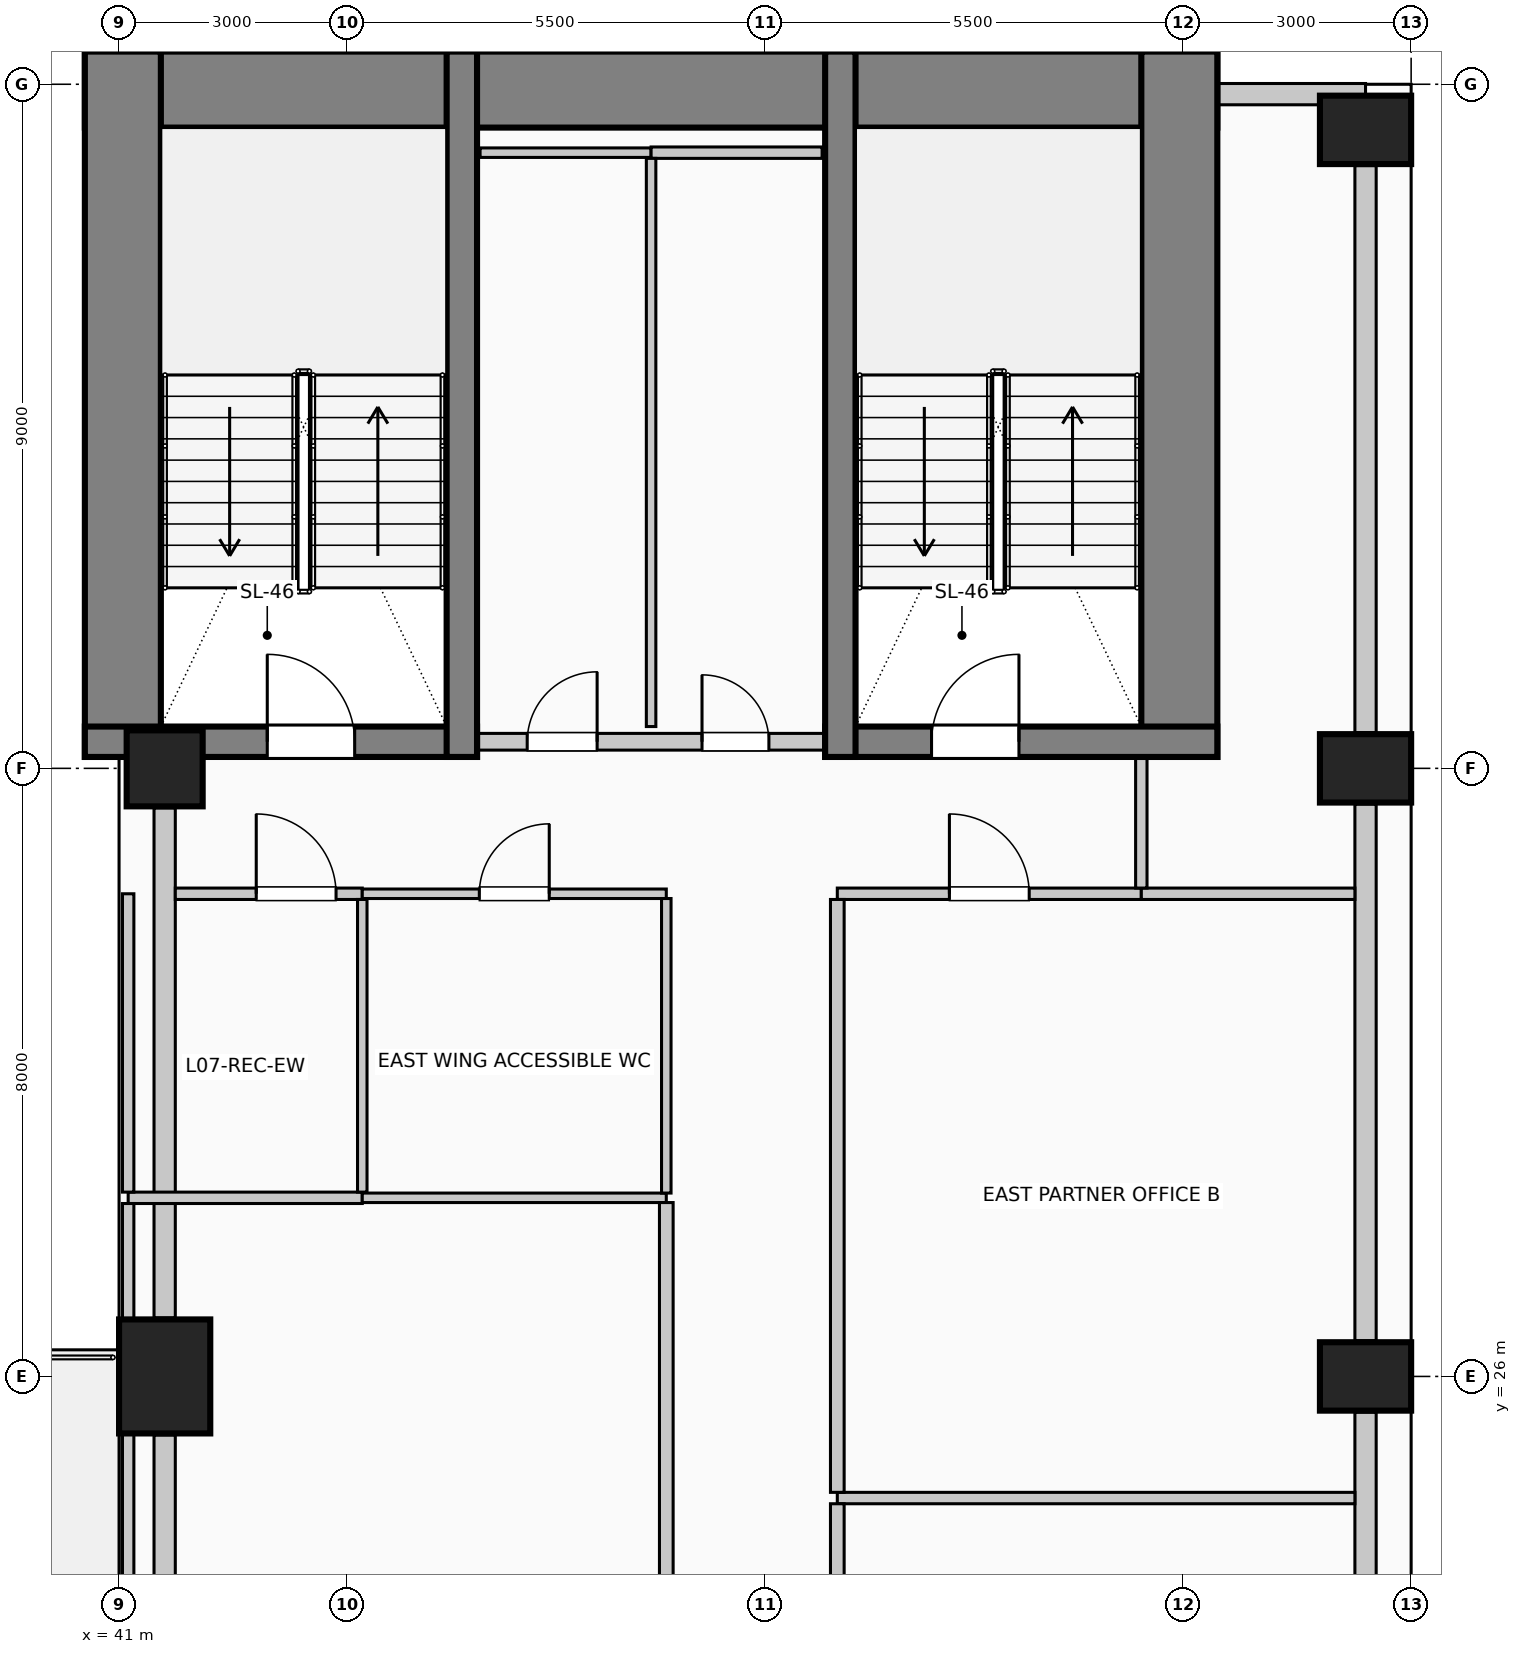
"""IFC4 building model, lengths in metres.
Left out: names, types, materials, properties, quantities, classifications, styles, units other than length and angle.
Written with IfcOpenShell. Run it as: python <this file> out.ifc"""

import sys

from ifc_helpers import new_model, si_unit, direction, frame, frame_2d, origin, origin_2d, place, context, subcontext, project, spatial, rectangle, circle, extrude, element, fill, save


model = new_model("IFC4")
c1 = context("Model", 3, precision=1e-05, world=origin(), true_north=direction((0.0, 1.0)))
c2 = subcontext(c1, "Body", "Model", "MODEL_VIEW")
j1 = project(units=[si_unit("LENGTHUNIT", "METRE"), si_unit("PLANEANGLEUNIT", "RADIAN")], contexts=[c1])
p1 = place(None, origin())
s1 = spatial("IfcSite", under=j1, at=p1, CompositionType="ELEMENT")
p2 = place(p1, origin())
s2 = spatial("IfcBuilding", under=s1, at=p2, CompositionType="ELEMENT")
p3 = place(p2, frame((0.0, 0.0, 30.6)))
s3 = spatial("IfcBuildingStorey", under=s2, at=p3, CompositionType="ELEMENT", Elevation=30.6)
p4 = place(p3, frame((40.55, 42.93, 0.0), z_axis=(0.0, 0.0, 1.0), x_axis=(1.0, 0.0, 0.0)))
e1 = element("IfcWall", 1, at=p4, inside=s3, PredefinedType="SHEAR", context=c2, shape_type="SweptSolid", body=[
    extrude(rectangle(XDim=14.9, YDim=1.0, at=frame_2d((7.45, 0.0))), origin(), (0.0, 0.0, 1.0), 4.0),
])
for number, where, z_axis, x_axis in (
    (2, (41.05, 34.15, 0.0), (0.0, 0.0, 1.0), (0.0, 1.0, 0.0)),
    (3, (54.95, 34.15, 0.0), (0.0, 0.0, 1.0), (0.0, 1.0, 0.0)),
):
    element("IfcWall", number, at=place(p3, frame(where, z_axis=z_axis, x_axis=x_axis)), inside=s3, PredefinedType="SHEAR", context=c2, shape_type="SweptSolid", body=[
        extrude(rectangle(XDim=9.28, YDim=1.0, at=frame_2d((4.64, 0.0))), origin(), (0.0, 0.0, 1.0), 4.0),
    ])
p5 = place(p3, frame((40.55, 34.35, 0.0), z_axis=(0.0, 0.0, 1.0), x_axis=(1.0, 0.0, 0.0)))
e4 = element("IfcWall", 4, at=p5, inside=s3, PredefinedType="SHEAR", context=c2, shape_type="SweptSolid", body=[
    extrude(rectangle(XDim=5.16, YDim=0.4, at=frame_2d((2.58, 0.0))), origin(), (0.0, 0.0, 1.0), 4.0),
])
p6 = place(p5, frame((2.4, 0.0, 0.0)))
e5 = element("IfcOpeningElement", 5, at=p6, cuts=e4, PredefinedType="OPENING", context=c2, shape_type="SweptSolid", body=[
    extrude(rectangle(XDim=1.15, YDim=2.2, at=frame_2d((0.575, 1.1))), frame((0.0, 0.21, 0.0), z_axis=(0.0, -1.0, 0.0), x_axis=(1.0, 0.0, 0.0)), (0.0, 0.0, 1.0), 0.42),
])
p7 = place(p3, frame((45.51, 34.15, 0.0), z_axis=(0.0, 0.0, 1.0), x_axis=(0.0, 1.0, 0.0)))
e6 = element("IfcWall", 6, at=p7, inside=s3, PredefinedType="SHEAR", context=c2, shape_type="SweptSolid", body=[
    extrude(rectangle(XDim=9.28, YDim=0.4, at=frame_2d((4.64, 0.0))), origin(), (0.0, 0.0, 1.0), 4.0),
])
p8 = place(p3, frame((50.29, 34.35, 0.0), z_axis=(0.0, 0.0, 1.0), x_axis=(1.0, 0.0, 0.0)))
e7 = element("IfcWall", 7, at=p8, inside=s3, PredefinedType="SHEAR", context=c2, shape_type="SweptSolid", body=[
    extrude(rectangle(XDim=5.16, YDim=0.4, at=frame_2d((2.58, 0.0))), origin(), (0.0, 0.0, 1.0), 4.0),
])
p9 = place(p8, frame((1.4, 0.0, 0.0)))
e8 = element("IfcOpeningElement", 8, at=p9, cuts=e7, PredefinedType="OPENING", context=c2, shape_type="SweptSolid", body=[
    extrude(rectangle(XDim=1.15, YDim=2.2, at=frame_2d((0.575, 1.1))), frame((0.0, 0.21, 0.0), z_axis=(0.0, -1.0, 0.0), x_axis=(1.0, 0.0, 0.0)), (0.0, 0.0, 1.0), 0.42),
])
p10 = place(p3, frame((50.49, 34.15, 0.0), z_axis=(0.0, 0.0, 1.0), x_axis=(0.0, 1.0, 0.0)))
e9 = element("IfcWall", 9, at=p10, inside=s3, PredefinedType="SHEAR", context=c2, shape_type="SweptSolid", body=[
    extrude(rectangle(XDim=9.28, YDim=0.4, at=frame_2d((4.64, 0.0))), origin(), (0.0, 0.0, 1.0), 4.0),
])
for number, where, z_axis, x_axis in (
    (10, (57.4, 26.0, 0.0), (0.0, 0.0, 1.0), (0.0, 1.0, 0.0)),
    (11, (57.4, 34.0, 0.0), (0.0, 0.0, 1.0), (0.0, 1.0, 0.0)),
    (12, (57.4, 42.4, 0.0), (0.0, 0.0, 1.0), (0.0, 1.0, 0.0)),
):
    element("IfcColumn", number, at=place(p3, frame(where, z_axis=z_axis, x_axis=x_axis)), inside=s3, PredefinedType="COLUMN", context=c2, shape_type="SweptSolid", body=[
        extrude(rectangle(XDim=0.9, YDim=1.2, at=origin_2d()), origin(), (0.0, 0.0, 1.0), 4.0),
    ])
p11 = place(p3, frame((41.6, 26.0, 0.0), z_axis=(0.0, 0.0, 1.0), x_axis=(1.0, 0.0, 0.0)))
e13 = element("IfcColumn", 13, at=p11, inside=s3, PredefinedType="COLUMN", context=c2, shape_type="SweptSolid", body=[
    extrude(rectangle(XDim=1.2, YDim=1.5, at=origin_2d()), origin(), (0.0, 0.0, 1.0), 4.0),
])
p12 = place(p3, frame((41.6, 34.0, 0.0), z_axis=(0.0, 0.0, 1.0), x_axis=(1.0, 0.0, 0.0)))
e14 = element("IfcColumn", 14, at=p12, inside=s3, PredefinedType="COLUMN", context=c2, shape_type="SweptSolid", body=[
    extrude(circle(Radius=0.5, at=origin_2d()), origin(), (0.0, 0.0, 1.0), 4.0),
])
for number, where, z_axis, x_axis in (
    (15, (57.4, 25.53, 0.0), (0.0, 0.0, 1.0), (0.0, -1.0, 0.0)),
    (16, (57.4, 33.53, 0.0), (0.0, 0.0, 1.0), (0.0, -1.0, 0.0)),
):
    element("IfcWall", number, at=place(p3, frame(where, z_axis=z_axis, x_axis=x_axis)), inside=s3, PredefinedType="SOLIDWALL", context=c2, shape_type="SweptSolid", body=[
        extrude(rectangle(XDim=7.06, YDim=0.28, at=frame_2d((3.53, 0.0))), origin(), (0.0, 0.0, 1.0), 2.85),
    ])
p13 = place(p3, frame((57.4, 41.93, 0.0), z_axis=(0.0, 0.0, 1.0), x_axis=(0.0, -1.0, 0.0)))
e17 = element("IfcWall", 17, at=p13, inside=s3, PredefinedType="SOLIDWALL", context=c2, shape_type="SweptSolid", body=[
    extrude(rectangle(XDim=7.46, YDim=0.28, at=frame_2d((3.73, 0.0))), origin(), (0.0, 0.0, 1.0), 2.85),
])
p14 = place(p3, frame((55.455, 42.87, 0.0), z_axis=(0.0, 0.0, 1.0), x_axis=(1.0, 0.0, 0.0)))
e18 = element("IfcWall", 18, at=p14, inside=s3, PredefinedType="SOLIDWALL", context=c2, shape_type="SweptSolid", body=[
    extrude(rectangle(XDim=1.945, YDim=0.28, at=frame_2d((0.972, 0.0))), origin(), (0.0, 0.0, 1.0), 3.7),
])
p15 = place(p3, frame((41.6, 18.77, 0.0), z_axis=(0.0, 0.0, 1.0), x_axis=(0.0, 1.0, 0.0)))
e19 = element("IfcWall", 19, at=p15, inside=s3, PredefinedType="SOLIDWALL", context=c2, shape_type="SweptSolid", body=[
    extrude(rectangle(XDim=6.46, YDim=0.28, at=frame_2d((3.23, 0.0))), origin(), (0.0, 0.0, 1.0), 3.0),
])
p16 = place(p3, frame((41.6, 26.77, 0.0), z_axis=(0.0, 0.0, 1.0), x_axis=(0.0, 1.0, 0.0)))
e20 = element("IfcWall", 20, at=p16, inside=s3, PredefinedType="SOLIDWALL", context=c2, shape_type="SweptSolid", body=[
    extrude(rectangle(XDim=6.71, YDim=0.28, at=frame_2d((3.355, 0.0))), origin(), (0.0, 0.0, 1.0), 3.0),
])
p17 = place(p3, frame((45.72, 34.35, 0.0), z_axis=(0.0, 0.0, 1.0), x_axis=(1.0, 0.0, 0.0)))
e21 = element("IfcWall", 21, at=p17, inside=s3, PredefinedType="PARTITIONING", context=c2, shape_type="SweptSolid", body=[
    extrude(rectangle(XDim=4.56, YDim=0.22, at=frame_2d((2.28, 0.0))), origin(), (0.0, 0.0, 1.0), 3.7),
])
p18 = place(p17, frame((0.65, 0.0, 0.0)))
e22 = element("IfcOpeningElement", 22, at=p18, cuts=e21, PredefinedType="OPENING", context=c2, shape_type="SweptSolid", body=[
    extrude(rectangle(XDim=0.92, YDim=2.1, at=frame_2d((0.46, 1.05))), frame((0.0, 0.12, 0.0), z_axis=(0.0, -1.0, 0.0), x_axis=(1.0, 0.0, 0.0)), (0.0, 0.0, 1.0), 0.24),
])
p19 = place(p17, frame((2.95, 0.0, 0.0)))
e23 = element("IfcOpeningElement", 23, at=p19, cuts=e21, PredefinedType="OPENING", context=c2, shape_type="SweptSolid", body=[
    extrude(rectangle(XDim=0.88, YDim=2.1, at=frame_2d((0.44, 1.05))), frame((0.0, 0.12, 0.0), z_axis=(0.0, -1.0, 0.0), x_axis=(1.0, 0.0, 0.0)), (0.0, 0.0, 1.0), 0.24),
])
p20 = place(p3, frame((50.45, 24.4, 0.0), z_axis=(0.0, 0.0, 1.0), x_axis=(1.0, 0.0, 0.0)))
e24 = element("IfcWall", 24, at=p20, inside=s3, PredefinedType="PARTITIONING", context=c2, shape_type="SweptSolid", body=[
    extrude(rectangle(XDim=6.81, YDim=0.15, at=frame_2d((3.405, 0.0))), origin(), (0.0, 0.0, 1.0), 3.7),
])
p21 = place(p3, frame((41.12, 28.35, 0.0), z_axis=(0.0, 0.0, 1.0), x_axis=(1.0, 0.0, 0.0)))
e25 = element("IfcWall", 25, at=p21, inside=s3, PredefinedType="PARTITIONING", context=c2, shape_type="SweptSolid", body=[
    extrude(rectangle(XDim=3.08, YDim=0.15, at=frame_2d((1.54, 0.0))), origin(), (0.0, 0.0, 1.0), 3.7),
])
p22 = place(p3, frame((44.2, 28.35, 0.0), z_axis=(0.0, 0.0, 1.0), x_axis=(1.0, 0.0, 0.0)))
e26 = element("IfcWall", 26, at=p22, inside=s3, PredefinedType="PARTITIONING", context=c2, shape_type="SweptSolid", body=[
    extrude(rectangle(XDim=4.0, YDim=0.125, at=frame_2d((2.0, 0.0))), origin(), (0.0, 0.0, 1.0), 3.7),
])
p23 = place(p3, frame((41.74, 32.35, 0.0), z_axis=(0.0, 0.0, 1.0), x_axis=(1.0, 0.0, 0.0)))
e27 = element("IfcWall", 27, at=p23, inside=s3, PredefinedType="PARTITIONING", context=c2, shape_type="SweptSolid", body=[
    extrude(rectangle(XDim=2.46, YDim=0.15, at=frame_2d((1.23, 0.0))), origin(), (0.0, 0.0, 1.0), 3.7),
])
p24 = place(p23, frame((1.065, 0.0, 0.0)))
e28 = element("IfcOpeningElement", 28, at=p24, cuts=e27, PredefinedType="OPENING", context=c2, shape_type="SweptSolid", body=[
    extrude(rectangle(XDim=1.05, YDim=2.15, at=frame_2d((0.525, 1.075))), frame((0.0, 0.085, 0.0), z_axis=(0.0, -1.0, 0.0), x_axis=(1.0, 0.0, 0.0)), (0.0, 0.0, 1.0), 0.17),
])
p25 = place(p3, frame((44.2, 32.35, 0.0), z_axis=(0.0, 0.0, 1.0), x_axis=(1.0, 0.0, 0.0)))
e29 = element("IfcWall", 29, at=p25, inside=s3, PredefinedType="PARTITIONING", context=c2, shape_type="SweptSolid", body=[
    extrude(rectangle(XDim=4.0, YDim=0.125, at=frame_2d((2.0, 0.0))), origin(), (0.0, 0.0, 1.0), 3.7),
])
p26 = place(p25, frame((1.54, 0.0, 0.0)))
e30 = element("IfcOpeningElement", 30, at=p26, cuts=e29, PredefinedType="OPENING", context=c2, shape_type="SweptSolid", body=[
    extrude(rectangle(XDim=0.92, YDim=2.1, at=frame_2d((0.46, 1.05))), frame((0.0, 0.073, 0.0), z_axis=(0.0, -1.0, 0.0), x_axis=(1.0, 0.0, 0.0)), (0.0, 0.0, 1.0), 0.145),
])
p27 = place(p3, frame((50.45, 32.35, 0.0), z_axis=(0.0, 0.0, 1.0), x_axis=(1.0, 0.0, 0.0)))
e31 = element("IfcWall", 31, at=p27, inside=s3, PredefinedType="PARTITIONING", context=c2, shape_type="SweptSolid", body=[
    extrude(rectangle(XDim=4.0, YDim=0.15, at=frame_2d((2.0, 0.0))), origin(), (0.0, 0.0, 1.0), 3.7),
])
p28 = place(p27, frame((1.475, 0.0, 0.0)))
e32 = element("IfcOpeningElement", 32, at=p28, cuts=e31, PredefinedType="OPENING", context=c2, shape_type="SweptSolid", body=[
    extrude(rectangle(XDim=1.05, YDim=2.15, at=frame_2d((0.525, 1.075))), frame((0.0, 0.085, 0.0), z_axis=(0.0, -1.0, 0.0), x_axis=(1.0, 0.0, 0.0)), (0.0, 0.0, 1.0), 0.17),
])
p29 = place(p3, frame((54.45, 32.35, 0.0), z_axis=(0.0, 0.0, 1.0), x_axis=(1.0, 0.0, 0.0)))
e33 = element("IfcWall", 33, at=p29, inside=s3, PredefinedType="PARTITIONING", context=c2, shape_type="SweptSolid", body=[
    extrude(rectangle(XDim=2.81, YDim=0.15, at=frame_2d((1.405, 0.0))), origin(), (0.0, 0.0, 1.0), 3.7),
])
p30 = place(p3, frame((45.75, 42.1, 0.0), z_axis=(0.0, 0.0, 1.0), x_axis=(1.0, 0.0, 0.0)))
e34 = element("IfcWall", 34, at=p30, inside=s3, PredefinedType="PARTITIONING", context=c2, shape_type="SweptSolid", body=[
    extrude(rectangle(XDim=2.25, YDim=0.125, at=frame_2d((1.125, 0.0))), origin(), (0.0, 0.0, 1.0), 3.7),
])
p31 = place(p3, frame((48.0, 42.1, 0.0), z_axis=(0.0, 0.0, 1.0), x_axis=(1.0, 0.0, 0.0)))
e35 = element("IfcWall", 35, at=p31, inside=s3, PredefinedType="PARTITIONING", context=c2, shape_type="SweptSolid", body=[
    extrude(rectangle(XDim=2.25, YDim=0.15, at=frame_2d((1.125, 0.0))), origin(), (0.0, 0.0, 1.0), 3.7),
])
p32 = place(p3, frame((41.12, 18.75, 0.0), z_axis=(0.0, 0.0, 1.0), x_axis=(0.0, 1.0, 0.0)))
e36 = element("IfcWall", 36, at=p32, inside=s3, PredefinedType="PARTITIONING", context=c2, shape_type="SweptSolid", body=[
    extrude(rectangle(XDim=6.5, YDim=0.15, at=frame_2d((3.25, 0.0))), origin(), (0.0, 0.0, 1.0), 3.7),
])
p33 = place(p3, frame((41.12, 26.75, 0.0), z_axis=(0.0, 0.0, 1.0), x_axis=(0.0, 1.0, 0.0)))
e37 = element("IfcWall", 37, at=p33, inside=s3, PredefinedType="PARTITIONING", context=c2, shape_type="SweptSolid", body=[
    extrude(rectangle(XDim=1.525, YDim=0.15, at=frame_2d((0.762, 0.0))), origin(), (0.0, 0.0, 1.0), 3.7),
])
p34 = place(p3, frame((41.12, 28.425, 0.0), z_axis=(0.0, 0.0, 1.0), x_axis=(0.0, 1.0, 0.0)))
e38 = element("IfcWall", 38, at=p34, inside=s3, PredefinedType="PARTITIONING", context=c2, shape_type="SweptSolid", body=[
    extrude(rectangle(XDim=3.925, YDim=0.15, at=frame_2d((1.962, 0.0))), origin(), (0.0, 0.0, 1.0), 3.7),
])
p35 = place(p3, frame((44.2, 28.425, 0.0), z_axis=(0.0, 0.0, 1.0), x_axis=(0.0, 1.0, 0.0)))
e39 = element("IfcWall", 39, at=p35, inside=s3, PredefinedType="PARTITIONING", context=c2, shape_type="SweptSolid", body=[
    extrude(rectangle(XDim=3.85, YDim=0.125, at=frame_2d((1.925, 0.0))), origin(), (0.0, 0.0, 1.0), 3.7),
])
p36 = place(p3, frame((48.0, 34.55, 0.0), z_axis=(0.0, 0.0, 1.0), x_axis=(0.0, 1.0, 0.0)))
e40 = element("IfcWall", 40, at=p36, inside=s3, PredefinedType="PARTITIONING", context=c2, shape_type="SweptSolid", body=[
    extrude(rectangle(XDim=7.475, YDim=0.125, at=frame_2d((3.737, 0.0))), origin(), (0.0, 0.0, 1.0), 3.7),
])
p37 = place(p3, frame((48.2, 15.875, 0.0), z_axis=(0.0, 0.0, 1.0), x_axis=(0.0, 1.0, 0.0)))
e41 = element("IfcWall", 41, at=p37, inside=s3, PredefinedType="PARTITIONING", context=c2, shape_type="SweptSolid", body=[
    extrude(rectangle(XDim=12.413, YDim=0.18, at=frame_2d((6.206, 0.0))), origin(), (0.0, 0.0, 1.0), 3.7),
])
p38 = place(p37, frame((5.731, 0.0, 0.0)))
e42 = element("IfcOpeningElement", 42, at=p38, cuts=e41, PredefinedType="OPENING", context=c2, shape_type="SweptSolid", body=[
    extrude(rectangle(XDim=0.95, YDim=2.15, at=frame_2d((0.475, 1.075))), frame((0.0, 0.1, 0.0), z_axis=(0.0, -1.0, 0.0), x_axis=(1.0, 0.0, 0.0)), (0.0, 0.0, 1.0), 0.2),
])
p39 = place(p3, frame((48.2, 28.413, 0.0), z_axis=(0.0, 0.0, 1.0), x_axis=(0.0, 1.0, 0.0)))
e43 = element("IfcWall", 43, at=p39, inside=s3, PredefinedType="PARTITIONING", context=c2, shape_type="SweptSolid", body=[
    extrude(rectangle(XDim=3.875, YDim=0.125, at=frame_2d((1.938, 0.0))), origin(), (0.0, 0.0, 1.0), 3.7),
])
p40 = place(p3, frame((50.45, 16.475, 0.0), z_axis=(0.0, 0.0, 1.0), x_axis=(0.0, 1.0, 0.0)))
e44 = element("IfcWall", 44, at=p40, inside=s3, PredefinedType="PARTITIONING", context=c2, shape_type="SweptSolid", body=[
    extrude(rectangle(XDim=7.85, YDim=0.18, at=frame_2d((3.925, 0.0))), origin(), (0.0, 0.0, 1.0), 3.7),
])
p41 = place(p40, frame((3.4, 0.0, 0.0)))
e45 = element("IfcOpeningElement", 45, at=p41, cuts=e44, PredefinedType="OPENING", context=c2, shape_type="SweptSolid", body=[
    extrude(rectangle(XDim=1.05, YDim=2.15, at=frame_2d((0.525, 1.075))), frame((0.0, 0.1, 0.0), z_axis=(0.0, -1.0, 0.0), x_axis=(1.0, 0.0, 0.0)), (0.0, 0.0, 1.0), 0.2),
])
p42 = place(p3, frame((50.45, 24.475, 0.0), z_axis=(0.0, 0.0, 1.0), x_axis=(0.0, 1.0, 0.0)))
e46 = element("IfcWall", 46, at=p42, inside=s3, PredefinedType="PARTITIONING", context=c2, shape_type="SweptSolid", body=[
    extrude(rectangle(XDim=7.8, YDim=0.18, at=frame_2d((3.9, 0.0))), origin(), (0.0, 0.0, 1.0), 3.7),
])
p43 = place(p3, frame((54.45, 32.425, 0.0), z_axis=(0.0, 0.0, 1.0), x_axis=(0.0, 1.0, 0.0)))
e47 = element("IfcWall", 47, at=p43, inside=s3, PredefinedType="PARTITIONING", context=c2, shape_type="SweptSolid", body=[
    extrude(rectangle(XDim=1.725, YDim=0.15, at=frame_2d((0.862, 0.0))), origin(), (0.0, 0.0, 1.0), 3.7),
])
p44 = place(p6, origin())
e48 = element("IfcDoor", 48, at=p44, inside=s3, OperationType="SINGLE_SWING_LEFT", PredefinedType="DOOR", context=c2, shape_type="SweptSolid", body=[
    extrude(rectangle(XDim=1.15, YDim=2.2, at=frame_2d((0.575, 1.1))), frame((0.0, 0.025, 0.0), z_axis=(0.0, -1.0, 0.0), x_axis=(1.0, 0.0, 0.0)), (0.0, 0.0, 1.0), 0.05),
])
fill(e5, e48)
p45 = place(p18, origin())
e49 = element("IfcDoor", 49, at=p45, inside=s3, OperationType="SINGLE_SWING_RIGHT", PredefinedType="DOOR", context=c2, shape_type="SweptSolid", body=[
    extrude(rectangle(XDim=0.92, YDim=2.1, at=frame_2d((0.46, 1.05))), frame((0.0, 0.025, 0.0), z_axis=(0.0, -1.0, 0.0), x_axis=(1.0, 0.0, 0.0)), (0.0, 0.0, 1.0), 0.05),
])
fill(e22, e49)
p46 = place(p19, origin())
e50 = element("IfcDoor", 50, at=p46, inside=s3, OperationType="SINGLE_SWING_LEFT", PredefinedType="DOOR", context=c2, shape_type="SweptSolid", body=[
    extrude(rectangle(XDim=0.88, YDim=2.1, at=frame_2d((0.44, 1.05))), frame((0.0, 0.025, 0.0), z_axis=(0.0, -1.0, 0.0), x_axis=(1.0, 0.0, 0.0)), (0.0, 0.0, 1.0), 0.05),
])
fill(e23, e50)
p47 = place(p9, origin())
e51 = element("IfcDoor", 51, at=p47, inside=s3, OperationType="SINGLE_SWING_RIGHT", PredefinedType="DOOR", context=c2, shape_type="SweptSolid", body=[
    extrude(rectangle(XDim=1.15, YDim=2.2, at=frame_2d((0.575, 1.1))), frame((0.0, 0.025, 0.0), z_axis=(0.0, -1.0, 0.0), x_axis=(1.0, 0.0, 0.0)), (0.0, 0.0, 1.0), 0.05),
])
fill(e8, e51)
p48 = place(p24, origin())
e52 = element("IfcDoor", 52, at=p48, inside=s3, OperationType="SINGLE_SWING_LEFT", PredefinedType="DOOR", context=c2, shape_type="SweptSolid", body=[
    extrude(rectangle(XDim=1.05, YDim=2.15, at=frame_2d((0.525, 1.075))), frame((0.0, 0.025, 0.0), z_axis=(0.0, -1.0, 0.0), x_axis=(1.0, 0.0, 0.0)), (0.0, 0.0, 1.0), 0.05),
])
fill(e28, e52)
p49 = place(p26, origin())
e53 = element("IfcDoor", 53, at=p49, inside=s3, OperationType="SINGLE_SWING_RIGHT", PredefinedType="DOOR", context=c2, shape_type="SweptSolid", body=[
    extrude(rectangle(XDim=0.92, YDim=2.1, at=frame_2d((0.46, 1.05))), frame((0.0, 0.025, 0.0), z_axis=(0.0, -1.0, 0.0), x_axis=(1.0, 0.0, 0.0)), (0.0, 0.0, 1.0), 0.05),
])
fill(e30, e53)
p50 = place(p28, origin())
e54 = element("IfcDoor", 54, at=p50, inside=s3, OperationType="SINGLE_SWING_LEFT", PredefinedType="DOOR", context=c2, shape_type="SweptSolid", body=[
    extrude(rectangle(XDim=1.05, YDim=2.15, at=frame_2d((0.525, 1.075))), frame((0.0, 0.025, 0.0), z_axis=(0.0, -1.0, 0.0), x_axis=(1.0, 0.0, 0.0)), (0.0, 0.0, 1.0), 0.05),
])
fill(e32, e54)
save(model, sys.argv[1])
